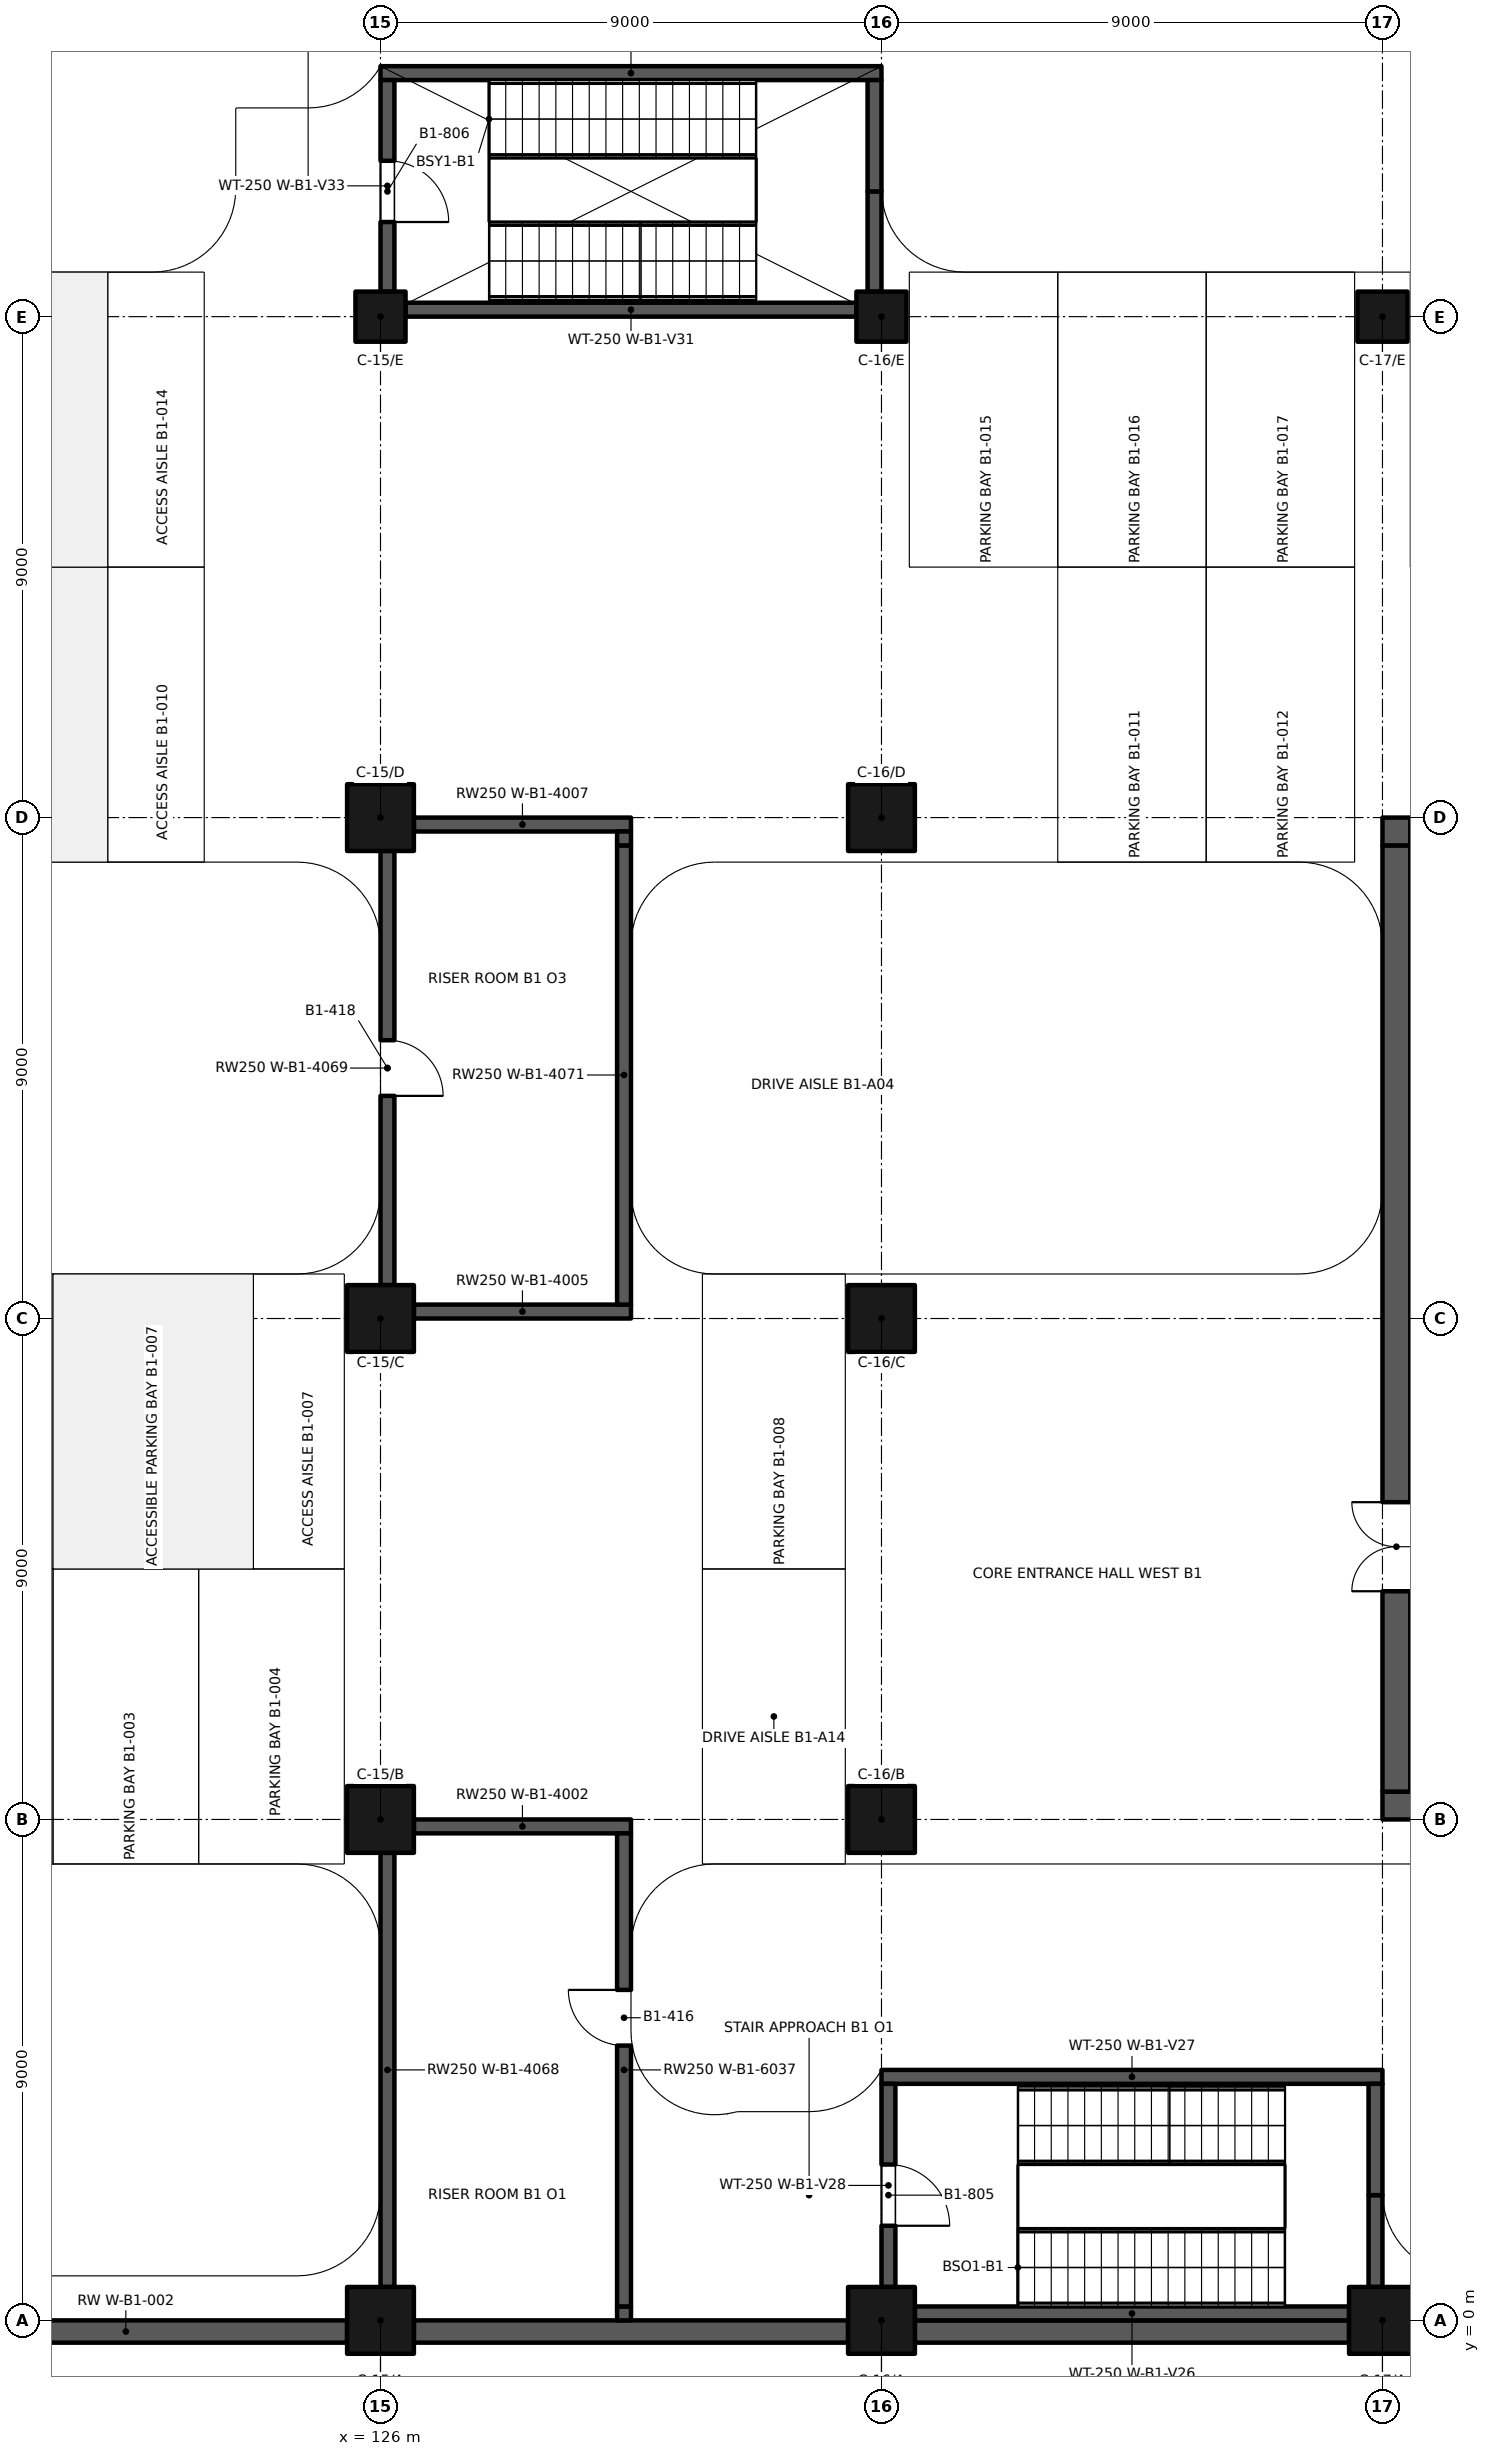
"""IFC4 building model, lengths in metres.
Left out: names, types, materials, properties, quantities, classifications, styles, units other than length and angle.
Written with IfcOpenShell. Run it as: python <this file> out.ifc"""

import sys

from ifc_helpers import new_model, si_unit, direction, frame, frame_2d, origin, origin_2d, place, context, subcontext, project, spatial, rectangle, extrude, element, fill, save


model = new_model("IFC4")
c1 = context("Model", 3, precision=1e-05, world=origin(), true_north=direction((0.0, 1.0)))
c2 = subcontext(c1, "Body", "Model", "MODEL_VIEW")
j1 = project(units=[si_unit("LENGTHUNIT", "METRE"), si_unit("PLANEANGLEUNIT", "RADIAN")], contexts=[c1])
p1 = place(None, origin())
s1 = spatial("IfcSite", under=j1, at=p1, CompositionType="ELEMENT")
p2 = place(p1, origin())
s2 = spatial("IfcBuilding", under=s1, at=p2, CompositionType="ELEMENT")
p3 = place(p2, frame((0.0, 0.0, -5.1)))
s3 = spatial("IfcBuildingStorey", under=s2, at=p3, CompositionType="ELEMENT", Elevation=-5.1)
p4 = place(p3, frame((117.45, -0.2, 0.0), z_axis=(0.0, 0.0, 1.0), x_axis=(1.0, 0.0, 0.0)))
e1 = element("IfcWall", 1, at=p4, inside=s3, PredefinedType="SOLIDWALL", context=c2, shape_type="SweptSolid", body=[
    extrude(rectangle(XDim=7.95, YDim=0.4, at=frame_2d((3.975, 0.0))), origin(), (0.0, 0.0, 1.0), 5.1),
])
for number, where, z_axis, x_axis in (
    (2, (126.6, -0.2, 0.0), (0.0, 0.0, 1.0), (1.0, 0.0, 0.0)),
    (3, (135.6, -0.2, 0.0), (0.0, 0.0, 1.0), (1.0, 0.0, 0.0)),
):
    element("IfcWall", number, at=place(p3, frame(where, z_axis=z_axis, x_axis=x_axis)), inside=s3, PredefinedType="SOLIDWALL", context=c2, shape_type="SweptSolid", body=[
        extrude(rectangle(XDim=7.8, YDim=0.4, at=frame_2d((3.9, 0.0))), origin(), (0.0, 0.0, 1.0), 5.1),
    ])
for number, where, z_axis, x_axis in (
    (4, (126.0, 0.0, 0.0), (0.0, 0.0, 1.0), (1.0, 0.0, 0.0)),
    (5, (135.0, 0.0, 0.0), (0.0, 0.0, 1.0), (1.0, 0.0, 0.0)),
    (6, (144.0, 0.0, 0.0), (0.0, 0.0, 1.0), (1.0, 0.0, 0.0)),
    (7, (126.0, 9.0, 0.0), (0.0, 0.0, 1.0), (1.0, 0.0, 0.0)),
    (8, (135.0, 9.0, 0.0), (0.0, 0.0, 1.0), (1.0, 0.0, 0.0)),
    (9, (126.0, 18.0, 0.0), (0.0, 0.0, 1.0), (1.0, 0.0, 0.0)),
    (10, (135.0, 18.0, 0.0), (0.0, 0.0, 1.0), (1.0, 0.0, 0.0)),
    (11, (126.0, 27.0, 0.0), (0.0, 0.0, 1.0), (1.0, 0.0, 0.0)),
    (12, (135.0, 27.0, 0.0), (0.0, 0.0, 1.0), (1.0, 0.0, 0.0)),
):
    element("IfcColumn", number, at=place(p3, frame(where, z_axis=z_axis, x_axis=x_axis)), inside=s3, PredefinedType="COLUMN", context=c2, shape_type="SweptSolid", body=[
        extrude(rectangle(XDim=1.2, YDim=1.2, at=origin_2d()), origin(), (0.0, 0.0, 1.0), 5.1),
    ])
for number, where, z_axis, x_axis in (
    (13, (126.0, 36.0, 0.0), (0.0, 0.0, 1.0), (1.0, 0.0, 0.0)),
    (14, (135.0, 36.0, 0.0), (0.0, 0.0, 1.0), (1.0, 0.0, 0.0)),
    (15, (144.0, 36.0, 0.0), (0.0, 0.0, 1.0), (1.0, 0.0, 0.0)),
):
    element("IfcColumn", number, at=place(p3, frame(where, z_axis=z_axis, x_axis=x_axis)), inside=s3, PredefinedType="COLUMN", context=c2, shape_type="SweptSolid", body=[
        extrude(rectangle(XDim=0.9, YDim=0.9, at=origin_2d()), origin(), (0.0, 0.0, 1.0), 5.1),
    ])
p5 = place(p3, frame((135.6, 0.125, 0.0), z_axis=(0.0, 0.0, 1.0), x_axis=(1.0, 0.0, 0.0)))
e16 = element("IfcWall", 16, at=p5, inside=s3, PredefinedType="SHEAR", context=c2, shape_type="SweptSolid", body=[
    extrude(rectangle(XDim=7.8, YDim=0.25, at=frame_2d((3.9, 0.0))), origin(), (0.0, 0.0, 1.0), 5.1),
])
p6 = place(p3, frame((135.0, 4.375, 0.0), z_axis=(0.0, 0.0, 1.0), x_axis=(1.0, 0.0, 0.0)))
e17 = element("IfcWall", 17, at=p6, inside=s3, PredefinedType="SHEAR", context=c2, shape_type="SweptSolid", body=[
    extrude(rectangle(XDim=9.0, YDim=0.25, at=frame_2d((4.5, 0.0))), origin(), (0.0, 0.0, 1.0), 5.1),
])
p7 = place(p3, frame((135.125, 0.6, 0.0), z_axis=(0.0, 0.0, 1.0), x_axis=(0.0, 1.0, 0.0)))
e18 = element("IfcWall", 18, at=p7, inside=s3, PredefinedType="SHEAR", context=c2, shape_type="SweptSolid", body=[
    extrude(rectangle(XDim=3.65, YDim=0.25, at=frame_2d((1.825, 0.0))), origin(), (0.0, 0.0, 1.0), 5.1),
])
p8 = place(p7, frame((2.2, 0.0, 0.0), z_axis=(0.0, 0.0, 1.0), x_axis=(-1.0, 0.0, 0.0)))
e19 = element("IfcOpeningElement", 19, at=p8, cuts=e18, PredefinedType="OPENING", context=c2, shape_type="SweptSolid", body=[
    extrude(rectangle(XDim=1.1, YDim=2.1, at=frame_2d((0.55, 1.05))), frame((0.0, 0.135, 0.0), z_axis=(0.0, -1.0, 0.0), x_axis=(1.0, 0.0, 0.0)), (0.0, 0.0, 1.0), 0.27),
])
p9 = place(p3, frame((143.875, 0.6, 0.0), z_axis=(0.0, 0.0, 1.0), x_axis=(0.0, 1.0, 0.0)))
e20 = element("IfcWall", 20, at=p9, inside=s3, PredefinedType="SHEAR", context=c2, shape_type="SweptSolid", body=[
    extrude(rectangle(XDim=1.65, YDim=0.25, at=frame_2d((0.825, 0.0))), origin(), (0.0, 0.0, 1.0), 5.1),
])
p10 = place(p3, frame((143.875, 2.25, 0.0), z_axis=(0.0, 0.0, 1.0), x_axis=(0.0, 1.0, 0.0)))
e21 = element("IfcWall", 21, at=p10, inside=s3, PredefinedType="SHEAR", context=c2, shape_type="SweptSolid", body=[
    extrude(rectangle(XDim=2.0, YDim=0.25, at=frame_2d((1.0, 0.0))), origin(), (0.0, 0.0, 1.0), 5.1),
])
p11 = place(p3, frame((126.45, 36.125, 0.0), z_axis=(0.0, 0.0, 1.0), x_axis=(1.0, 0.0, 0.0)))
e22 = element("IfcWall", 22, at=p11, inside=s3, PredefinedType="SHEAR", context=c2, shape_type="SweptSolid", body=[
    extrude(rectangle(XDim=8.1, YDim=0.25, at=frame_2d((4.05, 0.0))), origin(), (0.0, 0.0, 1.0), 5.1),
])
p12 = place(p3, frame((126.0, 40.375, 0.0), z_axis=(0.0, 0.0, 1.0), x_axis=(1.0, 0.0, 0.0)))
e23 = element("IfcWall", 23, at=p12, inside=s3, PredefinedType="SHEAR", context=c2, shape_type="SweptSolid", body=[
    extrude(rectangle(XDim=9.0, YDim=0.25, at=frame_2d((4.5, 0.0))), origin(), (0.0, 0.0, 1.0), 5.1),
])
p13 = place(p3, frame((126.125, 36.45, 0.0), z_axis=(0.0, 0.0, 1.0), x_axis=(0.0, 1.0, 0.0)))
e24 = element("IfcWall", 24, at=p13, inside=s3, PredefinedType="SHEAR", context=c2, shape_type="SweptSolid", body=[
    extrude(rectangle(XDim=3.8, YDim=0.25, at=frame_2d((1.9, 0.0))), origin(), (0.0, 0.0, 1.0), 5.1),
])
p14 = place(p13, frame((2.35, 0.0, 0.0), z_axis=(0.0, 0.0, 1.0), x_axis=(-1.0, 0.0, 0.0)))
e25 = element("IfcOpeningElement", 25, at=p14, cuts=e24, PredefinedType="OPENING", context=c2, shape_type="SweptSolid", body=[
    extrude(rectangle(XDim=1.1, YDim=2.1, at=frame_2d((0.55, 1.05))), frame((0.0, 0.135, 0.0), z_axis=(0.0, -1.0, 0.0), x_axis=(1.0, 0.0, 0.0)), (0.0, 0.0, 1.0), 0.27),
])
p15 = place(p3, frame((134.875, 36.45, 0.0), z_axis=(0.0, 0.0, 1.0), x_axis=(0.0, 1.0, 0.0)))
e26 = element("IfcWall", 26, at=p15, inside=s3, PredefinedType="SHEAR", context=c2, shape_type="SweptSolid", body=[
    extrude(rectangle(XDim=1.8, YDim=0.25, at=frame_2d((0.9, 0.0))), origin(), (0.0, 0.0, 1.0), 5.1),
])
p16 = place(p3, frame((134.875, 38.25, 0.0), z_axis=(0.0, 0.0, 1.0), x_axis=(0.0, 1.0, 0.0)))
e27 = element("IfcWall", 27, at=p16, inside=s3, PredefinedType="SHEAR", context=c2, shape_type="SweptSolid", body=[
    extrude(rectangle(XDim=2.0, YDim=0.25, at=frame_2d((1.0, 0.0))), origin(), (0.0, 0.0, 1.0), 5.1),
])
p17 = place(p3, frame((126.6, 8.875, 0.0), z_axis=(0.0, 0.0, 1.0), x_axis=(1.0, 0.0, 0.0)))
e28 = element("IfcWall", 28, at=p17, inside=s3, PredefinedType="SOLIDWALL", context=c2, shape_type="SweptSolid", body=[
    extrude(rectangle(XDim=3.9, YDim=0.25, at=frame_2d((1.95, 0.0))), origin(), (0.0, 0.0, 1.0), 4.75),
])
p18 = place(p3, frame((144.0, 9.25, 0.0), z_axis=(0.0, 0.0, 1.0), x_axis=(1.0, 0.0, 0.0)))
e29 = element("IfcWall", 29, at=p18, inside=s3, PredefinedType="SHEAR", context=c2, shape_type="SweptSolid", body=[
    extrude(rectangle(XDim=18.0, YDim=0.5, at=frame_2d((9.0, 0.0))), origin(), (0.0, 0.0, 1.0), 4.75),
])
p19 = place(p18, frame((16.425, 0.0, 0.0), z_axis=(0.0, 0.0, 1.0), x_axis=(-1.0, 0.0, 0.0)))
e30 = element("IfcOpeningElement", 30, at=p19, cuts=e29, PredefinedType="OPENING", context=c2, shape_type="SweptSolid", body=[
    extrude(rectangle(XDim=2.1, YDim=2.4, at=frame_2d((1.05, 1.2))), frame((0.0, 0.26, 0.0), z_axis=(0.0, -1.0, 0.0), x_axis=(1.0, 0.0, 0.0)), (0.0, 0.0, 1.0), 0.52),
])
p20 = place(p3, frame((126.6, 18.125, 0.0), z_axis=(0.0, 0.0, 1.0), x_axis=(1.0, 0.0, 0.0)))
e31 = element("IfcWall", 31, at=p20, inside=s3, PredefinedType="SOLIDWALL", context=c2, shape_type="SweptSolid", body=[
    extrude(rectangle(XDim=3.9, YDim=0.25, at=frame_2d((1.95, 0.0))), origin(), (0.0, 0.0, 1.0), 4.75),
])
p21 = place(p3, frame((126.6, 26.875, 0.0), z_axis=(0.0, 0.0, 1.0), x_axis=(1.0, 0.0, 0.0)))
e32 = element("IfcWall", 32, at=p21, inside=s3, PredefinedType="SOLIDWALL", context=c2, shape_type="SweptSolid", body=[
    extrude(rectangle(XDim=3.9, YDim=0.25, at=frame_2d((1.95, 0.0))), origin(), (0.0, 0.0, 1.0), 4.2),
])
p22 = place(p3, frame((126.125, 0.6, 0.0), z_axis=(0.0, 0.0, 1.0), x_axis=(0.0, 1.0, 0.0)))
e33 = element("IfcWall", 33, at=p22, inside=s3, PredefinedType="SOLIDWALL", context=c2, shape_type="SweptSolid", body=[
    extrude(rectangle(XDim=7.8, YDim=0.25, at=frame_2d((3.9, 0.0))), origin(), (0.0, 0.0, 1.0), 4.2),
])
p23 = place(p3, frame((126.125, 18.6, 0.0), z_axis=(0.0, 0.0, 1.0), x_axis=(0.0, 1.0, 0.0)))
e34 = element("IfcWall", 34, at=p23, inside=s3, PredefinedType="SOLIDWALL", context=c2, shape_type="SweptSolid", body=[
    extrude(rectangle(XDim=7.8, YDim=0.25, at=frame_2d((3.9, 0.0))), origin(), (0.0, 0.0, 1.0), 4.2),
])
p24 = place(p23, frame((4.4, 0.0, 0.0), z_axis=(0.0, 0.0, 1.0), x_axis=(-1.0, 0.0, 0.0)))
e35 = element("IfcOpeningElement", 35, at=p24, cuts=e34, PredefinedType="OPENING", context=c2, shape_type="SweptSolid", body=[
    extrude(rectangle(XDim=1.0, YDim=2.1, at=frame_2d((0.5, 1.05))), frame((0.0, 0.135, 0.0), z_axis=(0.0, -1.0, 0.0), x_axis=(1.0, 0.0, 0.0)), (0.0, 0.0, 1.0), 0.27),
])
p25 = place(p3, frame((130.375, 0.0, 0.0), z_axis=(0.0, 0.0, 1.0), x_axis=(0.0, 1.0, 0.0)))
e36 = element("IfcWall", 36, at=p25, inside=s3, PredefinedType="SOLIDWALL", context=c2, shape_type="SweptSolid", body=[
    extrude(rectangle(XDim=0.25, YDim=0.25, at=frame_2d((0.125, 0.0))), origin(), (0.0, 0.0, 1.0), 4.2),
])
p26 = place(p3, frame((130.375, 0.25, 0.0), z_axis=(0.0, 0.0, 1.0), x_axis=(0.0, 1.0, 0.0)))
e37 = element("IfcWall", 37, at=p26, inside=s3, PredefinedType="SOLIDWALL", context=c2, shape_type="SweptSolid", body=[
    extrude(rectangle(XDim=8.5, YDim=0.25, at=frame_2d((4.25, 0.0))), origin(), (0.0, 0.0, 1.0), 4.75),
])
p27 = place(p26, frame((4.688, 0.0, 0.0)))
e38 = element("IfcOpeningElement", 38, at=p27, cuts=e37, PredefinedType="OPENING", context=c2, shape_type="SweptSolid", body=[
    extrude(rectangle(XDim=1.0, YDim=2.1, at=frame_2d((0.5, 1.05))), frame((0.0, 0.135, 0.0), z_axis=(0.0, -1.0, 0.0), x_axis=(1.0, 0.0, 0.0)), (0.0, 0.0, 1.0), 0.27),
])
p28 = place(p3, frame((130.375, 18.25, 0.0), z_axis=(0.0, 0.0, 1.0), x_axis=(0.0, 1.0, 0.0)))
e39 = element("IfcWall", 39, at=p28, inside=s3, PredefinedType="SOLIDWALL", context=c2, shape_type="SweptSolid", body=[
    extrude(rectangle(XDim=8.25, YDim=0.25, at=frame_2d((4.125, 0.0))), origin(), (0.0, 0.0, 1.0), 4.75),
])
p29 = place(p3, frame((130.375, 26.5, 0.0), z_axis=(0.0, 0.0, 1.0), x_axis=(0.0, 1.0, 0.0)))
e40 = element("IfcWall", 40, at=p29, inside=s3, PredefinedType="SOLIDWALL", context=c2, shape_type="SweptSolid", body=[
    extrude(rectangle(XDim=0.25, YDim=0.25, at=frame_2d((0.125, 0.0))), origin(), (0.0, 0.0, 1.0), 4.2),
])
p30 = place(p3, frame((144.25, 9.5, 0.0), z_axis=(0.0, 0.0, 1.0), x_axis=(0.0, 1.0, 0.0)))
e41 = element("IfcWall", 41, at=p30, inside=s3, PredefinedType="SHEAR", context=c2, shape_type="SweptSolid", body=[
    extrude(rectangle(XDim=17.0, YDim=0.5, at=frame_2d((8.5, 0.0))), origin(), (0.0, 0.0, 1.0), 4.75),
])
p31 = place(p30, frame((3.6, 0.0, 0.0)))
e42 = element("IfcOpeningElement", 42, at=p31, cuts=e41, PredefinedType="OPENING", context=c2, shape_type="SweptSolid", body=[
    extrude(rectangle(XDim=1.6, YDim=2.4, at=frame_2d((0.8, 1.2))), frame((0.0, 0.26, 0.0), z_axis=(0.0, -1.0, 0.0), x_axis=(1.0, 0.0, 0.0)), (0.0, 0.0, 1.0), 0.52),
])
p32 = place(p3, frame((144.25, 26.5, 0.0), z_axis=(0.0, 0.0, 1.0), x_axis=(0.0, 1.0, 0.0)))
e43 = element("IfcWall", 43, at=p32, inside=s3, PredefinedType="SHEAR", context=c2, shape_type="SweptSolid", body=[
    extrude(rectangle(XDim=0.5, YDim=0.5, at=frame_2d((0.25, 0.0))), origin(), (0.0, 0.0, 1.0), 4.2),
])
p33 = place(p8, origin())
e44 = element("IfcDoor", 44, at=p33, inside=s3, OperationType="SINGLE_SWING_RIGHT", PredefinedType="DOOR", context=c2, shape_type="SweptSolid", body=[
    extrude(rectangle(XDim=1.1, YDim=2.1, at=frame_2d((0.55, 1.05))), frame((0.0, 0.025, 0.0), z_axis=(0.0, -1.0, 0.0), x_axis=(1.0, 0.0, 0.0)), (0.0, 0.0, 1.0), 0.05),
])
fill(e19, e44)
p34 = place(p14, origin())
e45 = element("IfcDoor", 45, at=p34, inside=s3, OperationType="SINGLE_SWING_RIGHT", PredefinedType="DOOR", context=c2, shape_type="SweptSolid", body=[
    extrude(rectangle(XDim=1.1, YDim=2.1, at=frame_2d((0.55, 1.05))), frame((0.0, 0.025, 0.0), z_axis=(0.0, -1.0, 0.0), x_axis=(1.0, 0.0, 0.0)), (0.0, 0.0, 1.0), 0.05),
])
fill(e25, e45)
p35 = place(p31, origin())
e46 = element("IfcDoor", 46, at=p35, inside=s3, OperationType="DOUBLE_DOOR_SINGLE_SWING", PredefinedType="DOOR", context=c2, shape_type="SweptSolid", body=[
    extrude(rectangle(XDim=1.6, YDim=2.4, at=frame_2d((0.8, 1.2))), frame((0.0, 0.025, 0.0), z_axis=(0.0, -1.0, 0.0), x_axis=(1.0, 0.0, 0.0)), (0.0, 0.0, 1.0), 0.05),
])
fill(e42, e46)
p36 = place(p27, origin())
e47 = element("IfcDoor", 47, at=p36, inside=s3, OperationType="SINGLE_SWING_RIGHT", PredefinedType="DOOR", context=c2, shape_type="SweptSolid", body=[
    extrude(rectangle(XDim=1.0, YDim=2.1, at=frame_2d((0.5, 1.05))), frame((0.0, 0.025, 0.0), z_axis=(0.0, -1.0, 0.0), x_axis=(1.0, 0.0, 0.0)), (0.0, 0.0, 1.0), 0.05),
])
fill(e38, e47)
p37 = place(p24, origin())
e48 = element("IfcDoor", 48, at=p37, inside=s3, OperationType="SINGLE_SWING_RIGHT", PredefinedType="DOOR", context=c2, shape_type="SweptSolid", body=[
    extrude(rectangle(XDim=1.0, YDim=2.1, at=frame_2d((0.5, 1.05))), frame((0.0, 0.025, 0.0), z_axis=(0.0, -1.0, 0.0), x_axis=(1.0, 0.0, 0.0)), (0.0, 0.0, 1.0), 0.05),
])
fill(e35, e48)
save(model, sys.argv[1])
